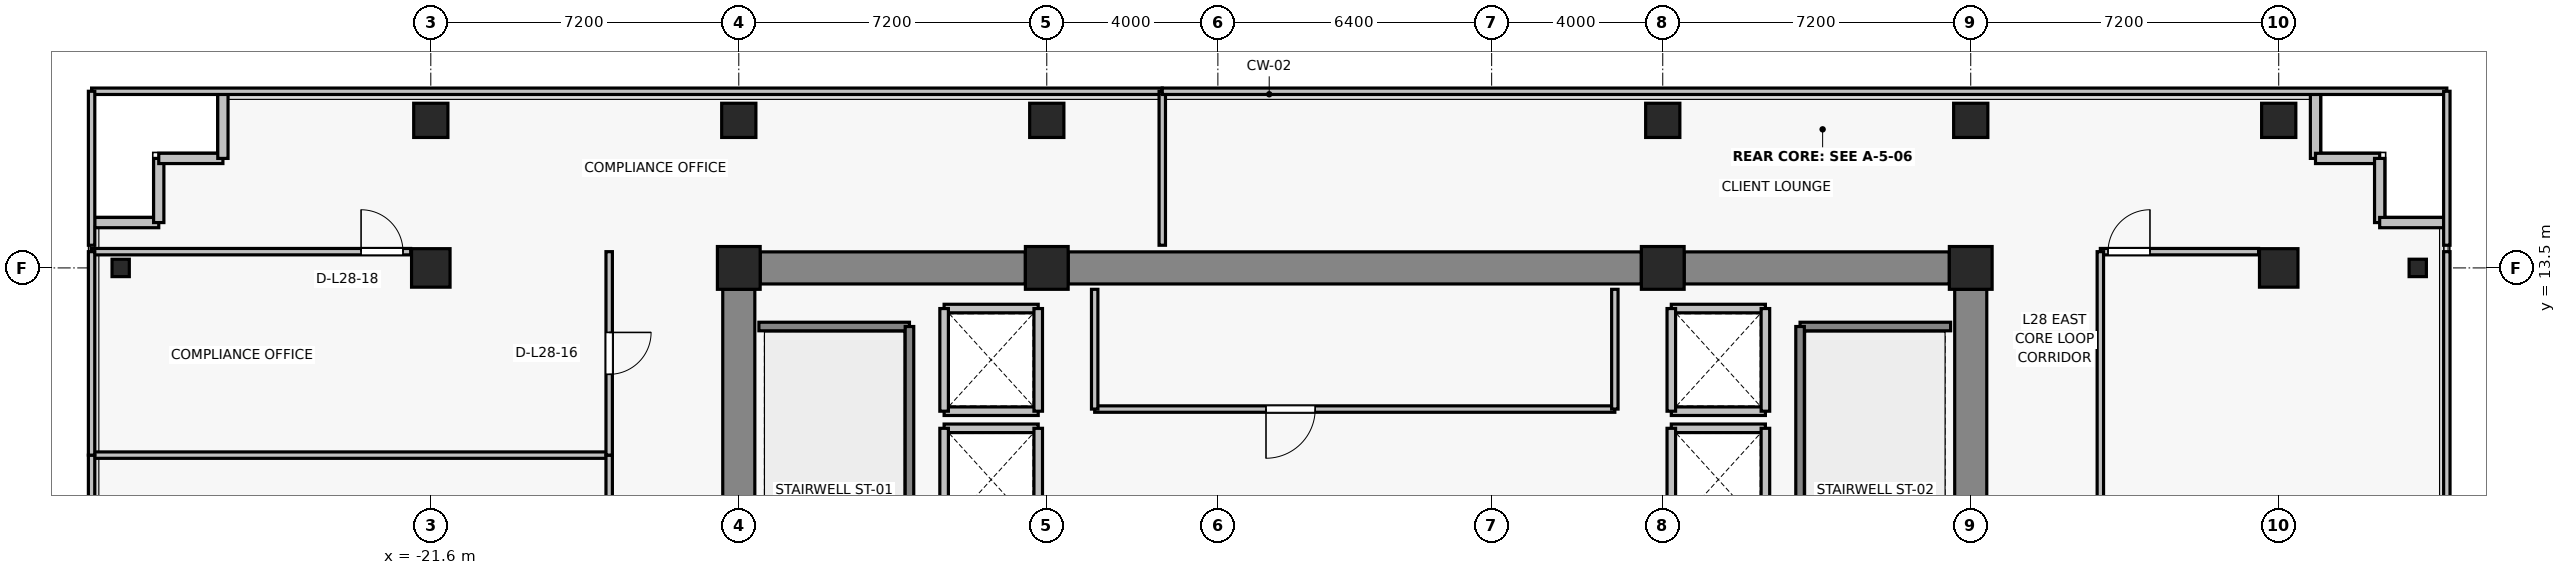
"""IFC4 building model, lengths in metres.
Left out: names, types, materials, properties, quantities, classifications, styles, units other than length and angle.
Written with IfcOpenShell. Run it as: python <this file> out.ifc"""

import sys

from ifc_helpers import new_model, si_unit, direction, frame, frame_2d, origin, origin_2d, place, context, subcontext, project, spatial, rectangle, i_section, extrude, source, transform, mapped, element, fill, save


model = new_model("IFC4")
c1 = context("Model", 3, precision=1e-05, world=origin(), true_north=direction((0.0, 1.0)))
c2 = subcontext(c1, "Body", "Model", "MODEL_VIEW")
j1 = project(units=[si_unit("LENGTHUNIT", "METRE"), si_unit("PLANEANGLEUNIT", "RADIAN")], contexts=[c1])
p1 = place(None, origin())
s1 = spatial("IfcSite", under=j1, at=p1, CompositionType="ELEMENT")
p2 = place(p1, origin())
s2 = spatial("IfcBuilding", under=s1, at=p2, CompositionType="ELEMENT")
p3 = place(p2, frame((0.0, 0.0, 103.3)))
s3 = spatial("IfcBuildingStorey", under=s2, at=p3, CompositionType="ELEMENT", Elevation=103.3)
for number, where, z_axis, x_axis in (
    (1, (-14.4, 13.5, 0.0), (0.0, 0.0, 1.0), (1.0, 0.0, 0.0)),
    (2, (-7.2, 13.5, 0.0), (0.0, 0.0, 1.0), (1.0, 0.0, 0.0)),
    (3, (7.2, 13.5, 0.0), (0.0, 0.0, 1.0), (1.0, 0.0, 0.0)),
    (4, (14.4, 13.5, 0.0), (0.0, 0.0, 1.0), (1.0, 0.0, 0.0)),
):
    element("IfcColumn", number, at=place(p3, frame(where, z_axis=z_axis, x_axis=x_axis)), inside=s3, PredefinedType="COLUMN", context=c2, shape_type="SweptSolid", body=[
        extrude(rectangle(XDim=1.0, YDim=1.0, at=origin_2d()), origin(), (0.0, 0.0, 1.0), 3.3),
    ])
for number, where, z_axis, x_axis in (
    (5, (-21.6, 13.5, 0.0), (0.0, 0.0, 1.0), (1.0, 0.0, 0.0)),
    (6, (21.6, 13.5, 0.0), (0.0, 0.0, 1.0), (1.0, 0.0, 0.0)),
):
    element("IfcColumn", number, at=place(p3, frame(where, z_axis=z_axis, x_axis=x_axis)), inside=s3, PredefinedType="COLUMN", context=c2, shape_type="SweptSolid", body=[
        extrude(rectangle(XDim=0.9, YDim=0.9, at=origin_2d()), origin(), (0.0, 0.0, 1.0), 3.3),
    ])
for number, where, z_axis, x_axis in (
    (7, (-14.4, 16.95, 0.0), (0.0, 0.0, 1.0), (1.0, 0.0, 0.0)),
    (8, (-7.2, 16.95, 0.0), (0.0, 0.0, 1.0), (1.0, 0.0, 0.0)),
    (9, (7.2, 16.95, 0.0), (0.0, 0.0, 1.0), (1.0, 0.0, 0.0)),
    (10, (14.4, 16.95, 0.0), (0.0, 0.0, 1.0), (1.0, 0.0, 0.0)),
    (11, (-21.6, 16.95, 0.0), (0.0, 0.0, 1.0), (1.0, 0.0, 0.0)),
    (12, (21.6, 16.95, 0.0), (0.0, 0.0, 1.0), (1.0, 0.0, 0.0)),
):
    element("IfcColumn", number, at=place(p3, frame(where, z_axis=z_axis, x_axis=x_axis)), inside=s3, PredefinedType="COLUMN", context=c2, shape_type="SweptSolid", body=[
        extrude(rectangle(XDim=0.8, YDim=0.8, at=origin_2d()), origin(), (0.0, 0.0, 1.0), 3.3),
    ])
for number, where, z_axis, x_axis in (
    (13, (-28.85, 13.5, 0.0), (0.0, 0.0, 1.0), (1.0, 0.0, 0.0)),
    (14, (24.85, 13.5, 0.0), (0.0, 0.0, 1.0), (1.0, 0.0, 0.0)),
):
    element("IfcColumn", number, at=place(p3, frame(where, z_axis=z_axis, x_axis=x_axis)), inside=s3, PredefinedType="COLUMN", context=c2, shape_type="SweptSolid", body=[
        extrude(i_section(OverallWidth=0.404, OverallDepth=0.407, WebThickness=0.022, FlangeThickness=0.032, FilletRadius=0.015, at=origin_2d()), origin(), (0.0, 0.0, 1.0), 3.3),
    ])
p4 = place(p3, frame((-13.9, 13.5, 0.0), z_axis=(0.0, 0.0, 1.0), x_axis=(1.0, 0.0, 0.0)))
e15 = element("IfcWall", 15, at=p4, inside=s3, PredefinedType="SHEAR", context=c2, shape_type="SweptSolid", body=[
    extrude(rectangle(XDim=6.2, YDim=0.75, at=frame_2d((3.1, 0.0))), origin(), (0.0, 0.0, 1.0), 3.075),
])
p5 = place(p3, frame((-6.7, 13.5, 0.0), z_axis=(0.0, 0.0, 1.0), x_axis=(1.0, 0.0, 0.0)))
e16 = element("IfcWall", 16, at=p5, inside=s3, PredefinedType="SHEAR", context=c2, shape_type="SweptSolid", body=[
    extrude(rectangle(XDim=13.4, YDim=0.75, at=frame_2d((6.7, 0.0))), origin(), (0.0, 0.0, 1.0), 3.075),
])
p6 = place(p3, frame((7.7, 13.5, 0.0), z_axis=(0.0, 0.0, 1.0), x_axis=(1.0, 0.0, 0.0)))
e17 = element("IfcWall", 17, at=p6, inside=s3, PredefinedType="SHEAR", context=c2, shape_type="SweptSolid", body=[
    extrude(rectangle(XDim=6.2, YDim=0.75, at=frame_2d((3.1, 0.0))), origin(), (0.0, 0.0, 1.0), 3.075),
])
for number, where, z_axis, x_axis in (
    (18, (-14.4, 7.1, 0.0), (0.0, 0.0, 1.0), (0.0, 1.0, 0.0)),
    (19, (14.4, 7.1, 0.0), (0.0, 0.0, 1.0), (0.0, 1.0, 0.0)),
):
    element("IfcWall", number, at=place(p3, frame(where, z_axis=z_axis, x_axis=x_axis)), inside=s3, PredefinedType="SHEAR", context=c2, shape_type="SweptSolid", body=[
        extrude(rectangle(XDim=5.9, YDim=0.75, at=frame_2d((2.95, 0.0))), origin(), (0.0, 0.0, 1.0), 3.075),
    ])
for number, where, z_axis, x_axis in (
    (20, (-27.96, 14.56, 0.0), (0.0, 0.0, 1.0), (-1.0, 0.0, 0.0)),
    (21, (-27.96, 16.06, 0.0), (0.0, 0.0, 1.0), (0.0, -1.0, 0.0)),
    (22, (-26.46, 16.06, 0.0), (0.0, 0.0, 1.0), (-1.0, 0.0, 0.0)),
    (23, (-26.46, 17.56, 0.0), (0.0, 0.0, 1.0), (0.0, -1.0, 0.0)),
):
    element("IfcWall", number, at=place(p3, frame(where, z_axis=z_axis, x_axis=x_axis)), inside=s3, PredefinedType="SOLIDWALL", context=c2, shape_type="SweptSolid", body=[
        extrude(rectangle(XDim=1.5, YDim=0.24, at=frame_2d((0.75, 0.0))), origin(), (0.0, 0.0, 1.0), 3.075),
    ])
p7 = place(p3, frame((22.46, 16.06, 0.0), z_axis=(0.0, 0.0, 1.0), x_axis=(0.0, 1.0, 0.0)))
e24 = element("IfcWall", 24, at=p7, inside=s3, PredefinedType="SOLIDWALL", context=c2, shape_type="SweptSolid", body=[
    extrude(rectangle(XDim=1.5, YDim=0.24, at=frame_2d((0.75, 0.0))), origin(), (0.0, 0.0, 1.0), 2.565),
])
for number, where, z_axis, x_axis in (
    (25, (23.96, 16.06, 0.0), (0.0, 0.0, 1.0), (-1.0, 0.0, 0.0)),
    (26, (23.96, 14.56, 0.0), (0.0, 0.0, 1.0), (0.0, 1.0, 0.0)),
    (27, (25.46, 14.56, 0.0), (0.0, 0.0, 1.0), (-1.0, 0.0, 0.0)),
):
    element("IfcWall", number, at=place(p3, frame(where, z_axis=z_axis, x_axis=x_axis)), inside=s3, PredefinedType="SOLIDWALL", context=c2, shape_type="SweptSolid", body=[
        extrude(rectangle(XDim=1.5, YDim=0.24, at=frame_2d((0.75, 0.0))), origin(), (0.0, 0.0, 1.0), 3.075),
    ])
p8 = place(p3, frame((-9.6, 9.75, 0.0), z_axis=(0.0, 0.0, 1.0), x_axis=(1.0, 0.0, 0.0)))
e28 = element("IfcWall", 28, at=p8, inside=s3, PredefinedType="SOLIDWALL", context=c2, shape_type="SweptSolid", body=[
    extrude(rectangle(XDim=2.2, YDim=0.2, at=frame_2d((1.1, 0.0))), origin(), (0.0, 0.0, 1.0), 2.515),
])
p9 = place(p3, frame((-9.6, 7.35, 0.0), z_axis=(0.0, 0.0, 1.0), x_axis=(0.0, 1.0, 0.0)))
e29 = element("IfcWall", 29, at=p9, inside=s3, PredefinedType="SOLIDWALL", context=c2, shape_type="SweptSolid", body=[
    extrude(rectangle(XDim=2.4, YDim=0.2, at=frame_2d((1.2, 0.0))), origin(), (0.0, 0.0, 1.0), 3.075),
])
p10 = place(p3, frame((-7.4, 9.75, 0.0), z_axis=(0.0, 0.0, 1.0), x_axis=(0.0, -1.0, 0.0)))
e30 = element("IfcWall", 30, at=p10, inside=s3, PredefinedType="SOLIDWALL", context=c2, shape_type="SweptSolid", body=[
    extrude(rectangle(XDim=2.4, YDim=0.2, at=frame_2d((1.2, 0.0))), origin(), (0.0, 0.0, 1.0), 2.515),
])
for number, where, z_axis, x_axis in (
    (31, (-7.4, 10.15, 0.0), (0.0, 0.0, 1.0), (-1.0, 0.0, 0.0)),
    (32, (-9.6, 12.55, 0.0), (0.0, 0.0, 1.0), (1.0, 0.0, 0.0)),
):
    element("IfcWall", number, at=place(p3, frame(where, z_axis=z_axis, x_axis=x_axis)), inside=s3, PredefinedType="SOLIDWALL", context=c2, shape_type="SweptSolid", body=[
        extrude(rectangle(XDim=2.2, YDim=0.2, at=frame_2d((1.1, 0.0))), origin(), (0.0, 0.0, 1.0), 2.515),
    ])
p11 = place(p3, frame((-9.6, 10.15, 0.0), z_axis=(0.0, 0.0, 1.0), x_axis=(0.0, 1.0, 0.0)))
e33 = element("IfcWall", 33, at=p11, inside=s3, PredefinedType="SOLIDWALL", context=c2, shape_type="SweptSolid", body=[
    extrude(rectangle(XDim=2.4, YDim=0.2, at=frame_2d((1.2, 0.0))), origin(), (0.0, 0.0, 1.0), 3.075),
])
p12 = place(p3, frame((-7.4, 12.55, 0.0), z_axis=(0.0, 0.0, 1.0), x_axis=(0.0, -1.0, 0.0)))
e34 = element("IfcWall", 34, at=p12, inside=s3, PredefinedType="SOLIDWALL", context=c2, shape_type="SweptSolid", body=[
    extrude(rectangle(XDim=2.4, YDim=0.2, at=frame_2d((1.2, 0.0))), origin(), (0.0, 0.0, 1.0), 2.515),
])
p13 = place(p3, frame((7.4, 9.75, 0.0), z_axis=(0.0, 0.0, 1.0), x_axis=(1.0, 0.0, 0.0)))
e35 = element("IfcWall", 35, at=p13, inside=s3, PredefinedType="SOLIDWALL", context=c2, shape_type="SweptSolid", body=[
    extrude(rectangle(XDim=2.2, YDim=0.2, at=frame_2d((1.1, 0.0))), origin(), (0.0, 0.0, 1.0), 2.515),
])
p14 = place(p3, frame((7.4, 7.35, 0.0), z_axis=(0.0, 0.0, 1.0), x_axis=(0.0, 1.0, 0.0)))
e36 = element("IfcWall", 36, at=p14, inside=s3, PredefinedType="SOLIDWALL", context=c2, shape_type="SweptSolid", body=[
    extrude(rectangle(XDim=2.4, YDim=0.2, at=frame_2d((1.2, 0.0))), origin(), (0.0, 0.0, 1.0), 2.515),
])
p15 = place(p3, frame((9.6, 9.75, 0.0), z_axis=(0.0, 0.0, 1.0), x_axis=(0.0, -1.0, 0.0)))
e37 = element("IfcWall", 37, at=p15, inside=s3, PredefinedType="SOLIDWALL", context=c2, shape_type="SweptSolid", body=[
    extrude(rectangle(XDim=2.4, YDim=0.2, at=frame_2d((1.2, 0.0))), origin(), (0.0, 0.0, 1.0), 3.075),
])
for number, where, z_axis, x_axis in (
    (38, (9.6, 10.15, 0.0), (0.0, 0.0, 1.0), (-1.0, 0.0, 0.0)),
    (39, (7.4, 12.55, 0.0), (0.0, 0.0, 1.0), (1.0, 0.0, 0.0)),
):
    element("IfcWall", number, at=place(p3, frame(where, z_axis=z_axis, x_axis=x_axis)), inside=s3, PredefinedType="SOLIDWALL", context=c2, shape_type="SweptSolid", body=[
        extrude(rectangle(XDim=2.2, YDim=0.2, at=frame_2d((1.1, 0.0))), origin(), (0.0, 0.0, 1.0), 2.515),
    ])
p16 = place(p3, frame((7.4, 10.15, 0.0), z_axis=(0.0, 0.0, 1.0), x_axis=(0.0, 1.0, 0.0)))
e40 = element("IfcWall", 40, at=p16, inside=s3, PredefinedType="SOLIDWALL", context=c2, shape_type="SweptSolid", body=[
    extrude(rectangle(XDim=2.4, YDim=0.2, at=frame_2d((1.2, 0.0))), origin(), (0.0, 0.0, 1.0), 2.515),
])
p17 = place(p3, frame((9.6, 12.55, 0.0), z_axis=(0.0, 0.0, 1.0), x_axis=(0.0, -1.0, 0.0)))
e41 = element("IfcWall", 41, at=p17, inside=s3, PredefinedType="SOLIDWALL", context=c2, shape_type="SweptSolid", body=[
    extrude(rectangle(XDim=2.4, YDim=0.2, at=frame_2d((1.2, 0.0))), origin(), (0.0, 0.0, 1.0), 3.075),
])
p18 = place(p3, frame((-13.93, 12.13, 0.0), z_axis=(0.0, 0.0, 1.0), x_axis=(1.0, 0.0, 0.0)))
e42 = element("IfcWall", 42, at=p18, inside=s3, PredefinedType="SOLIDWALL", context=c2, shape_type="SweptSolid", body=[
    extrude(rectangle(XDim=3.52, YDim=0.2, at=frame_2d((1.76, 0.0))), origin(), (0.0, 0.0, 1.0), 3.075),
])
p19 = place(p3, frame((-10.41, 12.13, 0.0), z_axis=(0.0, 0.0, 1.0), x_axis=(0.0, -1.0, 0.0)))
e43 = element("IfcWall", 43, at=p19, inside=s3, PredefinedType="SOLIDWALL", context=c2, shape_type="SweptSolid", body=[
    extrude(rectangle(XDim=8.84, YDim=0.2, at=frame_2d((4.42, 0.0))), origin(), (0.0, 0.0, 1.0), 3.075),
])
p20 = place(p3, frame((10.41, 12.13, 0.0), z_axis=(0.0, 0.0, 1.0), x_axis=(1.0, 0.0, 0.0)))
e44 = element("IfcWall", 44, at=p20, inside=s3, PredefinedType="SOLIDWALL", context=c2, shape_type="SweptSolid", body=[
    extrude(rectangle(XDim=3.52, YDim=0.2, at=frame_2d((1.76, 0.0))), origin(), (0.0, 0.0, 1.0), 3.075),
])
p21 = place(p3, frame((10.41, 3.29, 0.0), z_axis=(0.0, 0.0, 1.0), x_axis=(0.0, 1.0, 0.0)))
e45 = element("IfcWall", 45, at=p21, inside=s3, PredefinedType="SOLIDWALL", context=c2, shape_type="SweptSolid", body=[
    extrude(rectangle(XDim=8.84, YDim=0.2, at=frame_2d((4.42, 0.0))), origin(), (0.0, 0.0, 1.0), 3.075),
])
p22 = place(p3, frame((6.08, 10.2, 0.0), z_axis=(0.0, 0.0, 1.0), x_axis=(-1.0, 0.0, 0.0)))
e46 = element("IfcWall", 46, at=p22, inside=s3, PredefinedType="PARTITIONING", context=c2, shape_type="SweptSolid", body=[
    extrude(rectangle(XDim=12.16, YDim=0.15, at=frame_2d((6.08, 0.0))), origin(), (0.0, 0.0, 1.0), 3.075),
])
p23 = place(p22, frame((7.005, 0.0, 0.0)))
e47 = element("IfcOpeningElement", 47, at=p23, cuts=e46, PredefinedType="OPENING", context=c2, shape_type="SweptSolid", body=[
    extrude(rectangle(XDim=1.15, YDim=2.15, at=frame_2d((0.575, 1.075))), frame((0.0, 0.085, 0.0), z_axis=(0.0, -1.0, 0.0), x_axis=(1.0, 0.0, 0.0)), (0.0, 0.0, 1.0), 0.17),
])
for number, where, z_axis, x_axis in (
    (48, (-6.08, 10.2, 0.0), (0.0, 0.0, 1.0), (0.0, 1.0, 0.0)),
    (49, (6.08, 13.0, 0.0), (0.0, 0.0, 1.0), (0.0, -1.0, 0.0)),
):
    element("IfcWall", number, at=place(p3, frame(where, z_axis=z_axis, x_axis=x_axis)), inside=s3, PredefinedType="PARTITIONING", context=c2, shape_type="SweptSolid", body=[
        extrude(rectangle(XDim=2.8, YDim=0.15, at=frame_2d((1.4, 0.0))), origin(), (0.0, 0.0, 1.0), 3.075),
    ])
p24 = place(p3, frame((-29.53, 9.123, 0.0), z_axis=(0.0, 0.0, 1.0), x_axis=(1.0, 0.0, 0.0)))
e50 = element("IfcWall", 50, at=p24, inside=s3, PredefinedType="PARTITIONING", context=c2, shape_type="SweptSolid", body=[
    extrude(rectangle(XDim=12.1, YDim=0.15, at=frame_2d((6.05, 0.0))), origin(), (0.0, 0.0, 1.0), 2.515),
])
p25 = place(p3, frame((-29.53, 2.987, 0.0), z_axis=(0.0, 0.0, 1.0), x_axis=(0.0, 1.0, 0.0)))
e51 = element("IfcWall", 51, at=p25, inside=s3, PredefinedType="PARTITIONING", context=c2, shape_type="SweptSolid", body=[
    extrude(rectangle(XDim=6.136, YDim=0.15, at=frame_2d((3.068, 0.0))), origin(), (0.0, 0.0, 1.0), 3.075),
])
p26 = place(p3, frame((-17.43, 9.123, 0.0), z_axis=(0.0, 0.0, 1.0), x_axis=(0.0, -1.0, 0.0)))
e52 = element("IfcWall", 52, at=p26, inside=s3, PredefinedType="PARTITIONING", context=c2, shape_type="SweptSolid", body=[
    extrude(rectangle(XDim=6.136, YDim=0.15, at=frame_2d((3.068, 0.0))), origin(), (0.0, 0.0, 1.0), 2.515),
])
p27 = place(p26, frame((2.578, 0.0, 0.0)))
e53 = element("IfcOpeningElement", 53, at=p27, cuts=e52, PredefinedType="OPENING", context=c2, shape_type="SweptSolid", body=[
    extrude(rectangle(XDim=0.98, YDim=2.15, at=frame_2d((0.49, 1.075))), frame((0.0, 0.085, 0.0), z_axis=(0.0, -1.0, 0.0), x_axis=(1.0, 0.0, 0.0)), (0.0, 0.0, 1.0), 0.17),
])
p28 = place(p3, frame((-29.53, 13.88, 0.0), z_axis=(0.0, 0.0, 1.0), x_axis=(1.0, 0.0, 0.0)))
e54 = element("IfcWall", 54, at=p28, inside=s3, PredefinedType="PARTITIONING", context=c2, shape_type="SweptSolid", body=[
    extrude(rectangle(XDim=7.46, YDim=0.15, at=frame_2d((3.73, 0.0))), origin(), (0.0, 0.0, 1.0), 3.075),
])
p29 = place(p28, frame((6.3, 0.0, 0.0)))
e55 = element("IfcOpeningElement", 55, at=p29, cuts=e54, PredefinedType="OPENING", context=c2, shape_type="SweptSolid", body=[
    extrude(rectangle(XDim=0.98, YDim=2.15, at=frame_2d((0.49, 1.075))), frame((0.0, 0.085, 0.0), z_axis=(0.0, -1.0, 0.0), x_axis=(1.0, 0.0, 0.0)), (0.0, 0.0, 1.0), 0.17),
])
p30 = place(p3, frame((-29.53, 9.123, 0.0), z_axis=(0.0, 0.0, 1.0), x_axis=(0.0, 1.0, 0.0)))
e56 = element("IfcWall", 56, at=p30, inside=s3, PredefinedType="PARTITIONING", context=c2, shape_type="SweptSolid", body=[
    extrude(rectangle(XDim=4.757, YDim=0.15, at=frame_2d((2.378, 0.0))), origin(), (0.0, 0.0, 1.0), 3.075),
])
p31 = place(p3, frame((-17.43, 13.88, 0.0), z_axis=(0.0, 0.0, 1.0), x_axis=(0.0, -1.0, 0.0)))
e57 = element("IfcWall", 57, at=p31, inside=s3, PredefinedType="PARTITIONING", context=c2, shape_type="SweptSolid", body=[
    extrude(rectangle(XDim=4.757, YDim=0.15, at=frame_2d((2.378, 0.0))), origin(), (0.0, 0.0, 1.0), 2.515),
])
p32 = place(p31, frame((1.888, 0.0, 0.0)))
e58 = element("IfcOpeningElement", 58, at=p32, cuts=e57, PredefinedType="OPENING", context=c2, shape_type="SweptSolid", body=[
    extrude(rectangle(XDim=0.98, YDim=2.15, at=frame_2d((0.49, 1.075))), frame((0.0, 0.085, 0.0), z_axis=(0.0, -1.0, 0.0), x_axis=(1.0, 0.0, 0.0)), (0.0, 0.0, 1.0), 0.17),
])
p33 = place(p3, frame((17.43, 13.88, 0.0), z_axis=(0.0, 0.0, 1.0), x_axis=(1.0, 0.0, 0.0)))
e59 = element("IfcWall", 59, at=p33, inside=s3, PredefinedType="PARTITIONING", context=c2, shape_type="SweptSolid", body=[
    extrude(rectangle(XDim=3.7, YDim=0.15, at=frame_2d((1.85, 0.0))), origin(), (0.0, 0.0, 1.0), 3.075),
])
p34 = place(p33, frame((0.18, 0.0, 0.0)))
e60 = element("IfcOpeningElement", 60, at=p34, cuts=e59, PredefinedType="OPENING", context=c2, shape_type="SweptSolid", body=[
    extrude(rectangle(XDim=0.98, YDim=2.15, at=frame_2d((0.49, 1.075))), frame((0.0, 0.085, 0.0), z_axis=(0.0, -1.0, 0.0), x_axis=(1.0, 0.0, 0.0)), (0.0, 0.0, 1.0), 0.17),
])
p35 = place(p3, frame((17.43, -1.77, 0.0), z_axis=(0.0, 0.0, 1.0), x_axis=(0.0, 1.0, 0.0)))
e61 = element("IfcWall", 61, at=p35, inside=s3, PredefinedType="PARTITIONING", context=c2, shape_type="SweptSolid", body=[
    extrude(rectangle(XDim=15.65, YDim=0.15, at=frame_2d((7.825, 0.0))), origin(), (0.0, 0.0, 1.0), 2.515),
])
p36 = place(p35, frame((7.335, 0.0, 0.0)))
e62 = element("IfcOpeningElement", 62, at=p36, cuts=e61, PredefinedType="OPENING", context=c2, shape_type="SweptSolid", body=[
    extrude(rectangle(XDim=0.98, YDim=2.15, at=frame_2d((0.49, 1.075))), frame((0.0, 0.085, 0.0), z_axis=(0.0, -1.0, 0.0), x_axis=(1.0, 0.0, 0.0)), (0.0, 0.0, 1.0), 0.17),
])
p37 = place(p3, frame((25.53, 13.88, 0.0), z_axis=(0.0, 0.0, 1.0), x_axis=(0.0, -1.0, 0.0)))
e63 = element("IfcWall", 63, at=p37, inside=s3, PredefinedType="PARTITIONING", context=c2, shape_type="SweptSolid", body=[
    extrude(rectangle(XDim=15.65, YDim=0.15, at=frame_2d((7.825, 0.0))), origin(), (0.0, 0.0, 1.0), 3.075),
])
p38 = place(p3, frame((-29.53, 17.63, 0.0), z_axis=(0.0, 0.0, 1.0), x_axis=(1.0, 0.0, 0.0)))
e64 = element("IfcWall", 64, at=p38, inside=s3, PredefinedType="PARTITIONING", context=c2, shape_type="SweptSolid", body=[
    extrude(rectangle(XDim=25.03, YDim=0.15, at=frame_2d((12.515, 0.0))), origin(), (0.0, 0.0, 1.0), 3.075),
])
p39 = place(p3, frame((-29.53, 14.03, 0.0), z_axis=(0.0, 0.0, 1.0), x_axis=(0.0, 1.0, 0.0)))
e65 = element("IfcWall", 65, at=p39, inside=s3, PredefinedType="PARTITIONING", context=c2, shape_type="SweptSolid", body=[
    extrude(rectangle(XDim=3.6, YDim=0.15, at=frame_2d((1.8, 0.0))), origin(), (0.0, 0.0, 1.0), 3.075),
])
p40 = place(p3, frame((-4.5, 17.63, 0.0), z_axis=(0.0, 0.0, 1.0), x_axis=(0.0, -1.0, 0.0)))
e66 = element("IfcWall", 66, at=p40, inside=s3, PredefinedType="PARTITIONING", context=c2, shape_type="SweptSolid", body=[
    extrude(rectangle(XDim=3.6, YDim=0.15, at=frame_2d((1.8, 0.0))), origin(), (0.0, 0.0, 1.0), 2.565),
])
p41 = place(p3, frame((-4.5, 17.63, 0.0), z_axis=(0.0, 0.0, 1.0), x_axis=(1.0, 0.0, 0.0)))
e67 = element("IfcWall", 67, at=p41, inside=s3, PredefinedType="PARTITIONING", context=c2, shape_type="SweptSolid", body=[
    extrude(rectangle(XDim=30.03, YDim=0.15, at=frame_2d((15.015, 0.0))), origin(), (0.0, 0.0, 1.0), 3.075),
])
p42 = place(p3, frame((25.53, 17.63, 0.0), z_axis=(0.0, 0.0, 1.0), x_axis=(0.0, -1.0, 0.0)))
e68 = element("IfcWall", 68, at=p42, inside=s3, PredefinedType="PARTITIONING", context=c2, shape_type="SweptSolid", body=[
    extrude(rectangle(XDim=3.6, YDim=0.15, at=frame_2d((1.8, 0.0))), origin(), (0.0, 0.0, 1.0), 3.075),
])
m1 = source(origin(), c2, "Body", "SweptSolid", [
    extrude(rectangle(XDim=1.15, YDim=2.15, at=frame_2d((0.575, 1.075))), frame((0.0, 0.025, 0.0), z_axis=(0.0, -1.0, 0.0), x_axis=(1.0, 0.0, 0.0)), (0.0, 0.0, 1.0), 0.05),
])
p43 = place(p23, origin())
e69 = element("IfcDoor", 69, at=p43, inside=s3, OperationType="SINGLE_SWING_RIGHT", PredefinedType="DOOR", context=c2, shape_type="MappedRepresentation", body=[
    mapped(m1, transform((0.0, 0.0, 0.0), x_axis=(1.0, 0.0, 0.0), y_axis=(0.0, 1.0, 0.0), z_axis=(0.0, 0.0, 1.0), scale=1.0)),
])
fill(e47, e69)
m2 = source(origin(), c2, "Body", "SweptSolid", [
    extrude(rectangle(XDim=0.98, YDim=2.15, at=frame_2d((0.49, 1.075))), frame((0.0, 0.025, 0.0), z_axis=(0.0, -1.0, 0.0), x_axis=(1.0, 0.0, 0.0)), (0.0, 0.0, 1.0), 0.05),
])
p44 = place(p32, origin())
e70 = element("IfcDoor", 70, at=p44, inside=s3, OperationType="SINGLE_SWING_LEFT", PredefinedType="DOOR", context=c2, shape_type="MappedRepresentation", body=[
    mapped(m2, transform((0.0, 0.0, 0.0), x_axis=(1.0, 0.0, 0.0), y_axis=(0.0, 1.0, 0.0), z_axis=(0.0, 0.0, 1.0), scale=1.0)),
])
fill(e58, e70)
p45 = place(p29, origin())
e71 = element("IfcDoor", 71, at=p45, inside=s3, OperationType="SINGLE_SWING_LEFT", PredefinedType="DOOR", context=c2, shape_type="MappedRepresentation", body=[
    mapped(m2, transform((0.0, 0.0, 0.0), x_axis=(1.0, 0.0, 0.0), y_axis=(0.0, 1.0, 0.0), z_axis=(0.0, 0.0, 1.0), scale=1.0)),
])
fill(e55, e71)
p46 = place(p34, origin())
e72 = element("IfcDoor", 72, at=p46, inside=s3, OperationType="SINGLE_SWING_RIGHT", PredefinedType="DOOR", context=c2, shape_type="MappedRepresentation", body=[
    mapped(m2, transform((0.0, 0.0, 0.0), x_axis=(1.0, 0.0, 0.0), y_axis=(0.0, 1.0, 0.0), z_axis=(0.0, 0.0, 1.0), scale=1.0)),
])
fill(e60, e72)
save(model, sys.argv[1])
